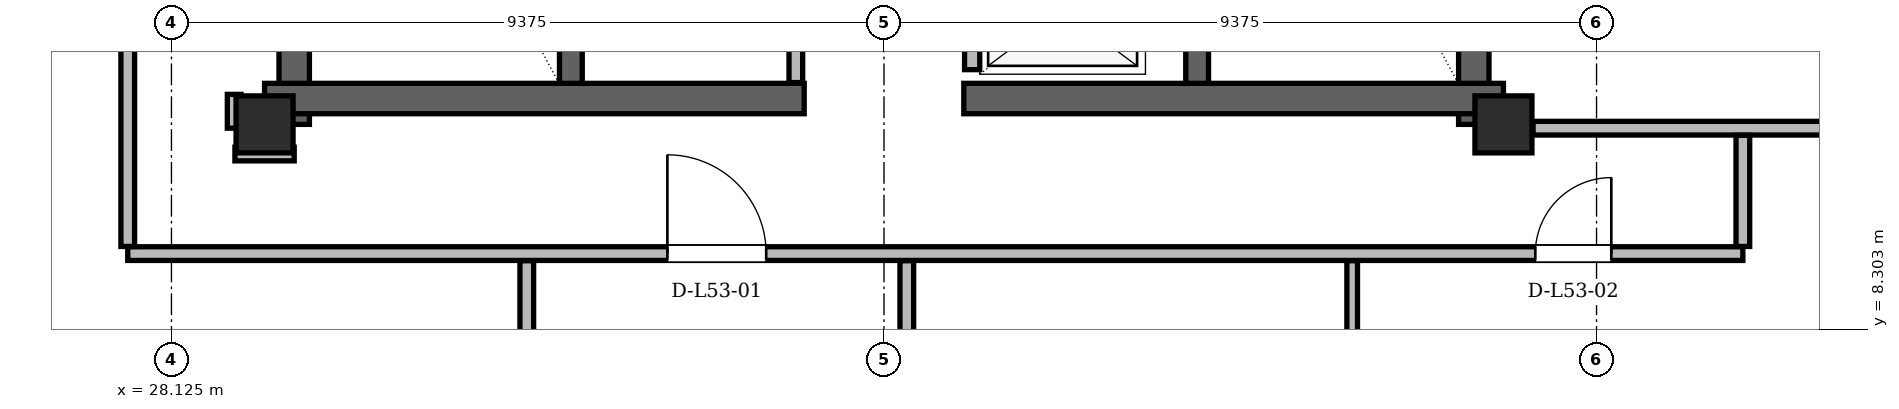
"""IFC4 building model, lengths in metres.
Left out: names, types, materials, properties, quantities, classifications, styles, units other than length and angle.
Written with IfcOpenShell. Run it as: python <this file> out.ifc"""

import sys

from ifc_helpers import new_model, si_unit, direction, frame, frame_2d, origin, origin_2d, place, context, subcontext, project, spatial, rectangle, hollow_rectangle, extrude, element, fill, save


model = new_model("IFC4")
c1 = context("Model", 3, precision=1e-05, world=origin(), true_north=direction((0.0, 1.0)))
c2 = subcontext(c1, "Body", "Model", "MODEL_VIEW")
j1 = project(units=[si_unit("LENGTHUNIT", "METRE"), si_unit("PLANEANGLEUNIT", "RADIAN")], contexts=[c1])
p1 = place(None, origin())
s1 = spatial("IfcSite", under=j1, at=p1, CompositionType="ELEMENT")
p2 = place(p1, origin())
s2 = spatial("IfcBuilding", under=s1, at=p2, CompositionType="ELEMENT")
p3 = place(p2, frame((0.0, 0.0, 201.0)))
s3 = spatial("IfcBuildingStorey", under=s2, at=p3, CompositionType="ELEMENT", Elevation=201.0)
for number, where, z_axis, x_axis in (
    (1, (29.35, 11.0, 0.0), (0.0, 0.0, 1.0), (1.0, 0.0, 0.0)),
    (2, (45.65, 11.0, 0.0), (0.0, 0.0, 1.0), (1.0, 0.0, 0.0)),
):
    element("IfcColumn", number, at=place(p3, frame(where, z_axis=z_axis, x_axis=x_axis)), inside=s3, PredefinedType="COLUMN", context=c2, shape_type="SweptSolid", body=[
        extrude(hollow_rectangle(XDim=0.75, YDim=0.75, WallThickness=0.06, at=origin_2d()), origin(), (0.0, 0.0, 1.0), 3.6),
    ])
for number, where, z_axis, x_axis in (
    (3, (29.74, 11.0, 0.0), (0.0, 0.0, 1.0), (0.0, 1.0, 0.0)),
    (4, (45.26, 11.0, 0.0), (0.0, 0.0, 1.0), (0.0, 1.0, 0.0)),
):
    element("IfcWall", number, at=place(p3, frame(where, z_axis=z_axis, x_axis=x_axis)), inside=s3, PredefinedType="SHEAR", context=c2, shape_type="SweptSolid", body=[
        extrude(rectangle(XDim=13.3, YDim=0.4, at=frame_2d((6.65, 0.0))), origin(), (0.0, 0.0, 1.0), 3.38),
    ])
for number, where, z_axis, x_axis in (
    (5, (29.35, 11.34, 0.0), (0.0, 0.0, 1.0), (1.0, 0.0, 0.0)),
    (6, (38.55, 11.34, 0.0), (0.0, 0.0, 1.0), (1.0, 0.0, 0.0)),
):
    element("IfcWall", number, at=place(p3, frame(where, z_axis=z_axis, x_axis=x_axis)), inside=s3, PredefinedType="SHEAR", context=c2, shape_type="SweptSolid", body=[
        extrude(rectangle(XDim=7.1, YDim=0.4, at=frame_2d((3.55, 0.0))), origin(), (0.0, 0.0, 1.0), 3.38),
    ])
for number, where, z_axis, x_axis in (
    (7, (33.38, 11.54, 0.0), (0.0, 0.0, 1.0), (0.0, 1.0, 0.0)),
    (8, (41.62, 11.54, 0.0), (0.0, 0.0, 1.0), (0.0, 1.0, 0.0)),
):
    element("IfcWall", number, at=place(p3, frame(where, z_axis=z_axis, x_axis=x_axis)), inside=s3, PredefinedType="SHEAR", context=c2, shape_type="SweptSolid", body=[
        extrude(rectangle(XDim=7.62, YDim=0.3, at=frame_2d((3.81, 0.0))), origin(), (0.0, 0.0, 1.0), 3.38),
    ])
p4 = place(p3, frame((59.335, 11.719, 0.0), z_axis=(0.0, 0.0, 1.0), x_axis=(-0.500001310321, 0.866024647269, 0.0)))
e9 = element("IfcWall", 9, at=p4, inside=s3, PredefinedType="SOLIDWALL", context=c2, shape_type="SweptSolid", body=[
    extrude(rectangle(XDim=36.352, YDim=0.29, at=frame_2d((18.176, 0.0))), origin(), (0.0, 0.0, 1.0), 2.677),
])
p5 = place(p4, frame((6.579, 0.0, 0.0)))
e10 = element("IfcOpeningElement", 10, at=p5, cuts=e9, PredefinedType="OPENING", context=c2, shape_type="SweptSolid", body=[
    extrude(rectangle(XDim=1.5, YDim=2.2, at=frame_2d((0.75, 1.1))), frame((0.0, 0.145, 0.0), z_axis=(0.0, -1.0, 0.0), x_axis=(1.0, 0.0, 0.0)), (0.0, 0.0, 1.0), 0.29),
])
p6 = place(p4, frame((26.817, 0.0, 0.0)))
e11 = element("IfcOpeningElement", 11, at=p6, cuts=e9, PredefinedType="OPENING", context=c2, shape_type="SweptSolid", body=[
    extrude(rectangle(XDim=1.5, YDim=2.2, at=frame_2d((0.75, 1.1))), frame((0.0, 0.145, 0.0), z_axis=(0.0, -1.0, 0.0), x_axis=(1.0, 0.0, 0.0)), (0.0, 0.0, 1.0), 0.29),
])
p7 = place(p4, frame((34.299, 0.0, 0.85)))
e12 = element("IfcOpeningElement", 12, at=p7, cuts=e9, PredefinedType="OPENING", context=c2, shape_type="SweptSolid", body=[
    extrude(rectangle(XDim=1.2, YDim=1.48, at=frame_2d((0.6, 0.74))), frame((0.0, 0.145, 0.0), z_axis=(0.0, -1.0, 0.0), x_axis=(1.0, 0.0, 0.0)), (0.0, 0.0, 1.0), 0.29),
])
p8 = place(p4, frame((16.249, 0.0, 0.85)))
e13 = element("IfcOpeningElement", 13, at=p8, cuts=e9, PredefinedType="OPENING", context=c2, shape_type="SweptSolid", body=[
    extrude(rectangle(XDim=2.4, YDim=1.717, at=frame_2d((1.2, 0.858))), frame((0.0, 0.145, 0.0), z_axis=(0.0, -1.0, 0.0), x_axis=(1.0, 0.0, 0.0)), (0.0, 0.0, 1.0), 0.29),
])
p9 = place(p4, frame((22.63, 0.0, 0.85)))
e14 = element("IfcOpeningElement", 14, at=p9, cuts=e9, PredefinedType="OPENING", context=c2, shape_type="SweptSolid", body=[
    extrude(rectangle(XDim=1.8, YDim=1.717, at=frame_2d((0.9, 0.858))), frame((0.0, 0.145, 0.0), z_axis=(0.0, -1.0, 0.0), x_axis=(1.0, 0.0, 0.0)), (0.0, 0.0, 1.0), 0.29),
])
p10 = place(p4, frame((32.084, 0.0, 0.85)))
e15 = element("IfcOpeningElement", 15, at=p10, cuts=e9, PredefinedType="OPENING", context=c2, shape_type="SweptSolid", body=[
    extrude(rectangle(XDim=1.6, YDim=1.7, at=frame_2d((0.8, 0.85))), frame((0.0, 0.145, 0.0), z_axis=(0.0, -1.0, 0.0), x_axis=(1.0, 0.0, 0.0)), (0.0, 0.0, 1.0), 0.29),
])
p11 = place(p3, frame((33.841, 43.2, 0.0), z_axis=(0.0, 0.0, 1.0), x_axis=(-0.500001310321, -0.866024647269, 0.0)))
e16 = element("IfcWall", 16, at=p11, inside=s3, PredefinedType="SOLIDWALL", context=c2, shape_type="SweptSolid", body=[
    extrude(rectangle(XDim=36.352, YDim=0.29, at=frame_2d((18.176, 0.0))), origin(), (0.0, 0.0, 1.0), 2.677),
])
p12 = place(p11, frame((6.579, 0.0, 0.0)))
e17 = element("IfcOpeningElement", 17, at=p12, cuts=e16, PredefinedType="OPENING", context=c2, shape_type="SweptSolid", body=[
    extrude(rectangle(XDim=1.5, YDim=2.2, at=frame_2d((0.75, 1.1))), frame((0.0, 0.145, 0.0), z_axis=(0.0, -1.0, 0.0), x_axis=(1.0, 0.0, 0.0)), (0.0, 0.0, 1.0), 0.29),
])
p13 = place(p11, frame((26.818, 0.0, 0.0)))
e18 = element("IfcOpeningElement", 18, at=p13, cuts=e16, PredefinedType="OPENING", context=c2, shape_type="SweptSolid", body=[
    extrude(rectangle(XDim=1.5, YDim=2.2, at=frame_2d((0.75, 1.1))), frame((0.0, 0.145, 0.0), z_axis=(0.0, -1.0, 0.0), x_axis=(1.0, 0.0, 0.0)), (0.0, 0.0, 1.0), 0.29),
])
p14 = place(p11, frame((32.924, 0.0, 0.85)))
e19 = element("IfcOpeningElement", 19, at=p14, cuts=e16, PredefinedType="OPENING", context=c2, shape_type="SweptSolid", body=[
    extrude(rectangle(XDim=1.2, YDim=1.48, at=frame_2d((0.6, 0.74))), frame((0.0, 0.145, 0.0), z_axis=(0.0, -1.0, 0.0), x_axis=(1.0, 0.0, 0.0)), (0.0, 0.0, 1.0), 0.29),
])
p15 = place(p11, frame((21.949, 0.0, 0.85)))
e20 = element("IfcOpeningElement", 20, at=p15, cuts=e16, PredefinedType="OPENING", context=c2, shape_type="SweptSolid", body=[
    extrude(rectangle(XDim=2.0, YDim=1.717, at=frame_2d((1.0, 0.858))), frame((0.0, 0.145, 0.0), z_axis=(0.0, -1.0, 0.0), x_axis=(1.0, 0.0, 0.0)), (0.0, 0.0, 1.0), 0.29),
])
p16 = place(p11, frame((2.823, 0.0, 0.85)))
e21 = element("IfcOpeningElement", 21, at=p16, cuts=e16, PredefinedType="OPENING", context=c2, shape_type="SweptSolid", body=[
    extrude(rectangle(XDim=1.6, YDim=1.7, at=frame_2d((0.8, 0.85))), frame((0.0, 0.145, 0.0), z_axis=(0.0, -1.0, 0.0), x_axis=(1.0, 0.0, 0.0)), (0.0, 0.0, 1.0), 0.29),
])
p17 = place(p11, frame((15.99, 0.0, 0.85)))
e22 = element("IfcOpeningElement", 22, at=p17, cuts=e16, PredefinedType="OPENING", context=c2, shape_type="SweptSolid", body=[
    extrude(rectangle(XDim=3.0, YDim=1.717, at=frame_2d((1.5, 0.858))), frame((0.0, 0.145, 0.0), z_axis=(0.0, -1.0, 0.0), x_axis=(1.0, 0.0, 0.0)), (0.0, 0.0, 1.0), 0.29),
])
p18 = place(p3, frame((36.34, 11.55, 0.0), z_axis=(0.0, 0.0, 1.0), x_axis=(0.0, 1.0, 0.0)))
e23 = element("IfcWall", 23, at=p18, inside=s3, PredefinedType="PARTITIONING", context=c2, shape_type="SweptSolid", body=[
    extrude(rectangle(XDim=5.55, YDim=0.18, at=frame_2d((2.775, 0.0))), origin(), (0.0, 0.0, 1.0), 3.38),
])
p19 = place(p18, frame((2.85, 0.0, 0.0)))
e24 = element("IfcOpeningElement", 24, at=p19, cuts=e23, PredefinedType="OPENING", context=c2, shape_type="SweptSolid", body=[
    extrude(rectangle(XDim=0.95, YDim=2.1, at=frame_2d((0.475, 1.05))), frame((0.0, 0.09, 0.0), z_axis=(0.0, -1.0, 0.0), x_axis=(1.0, 0.0, 0.0)), (0.0, 0.0, 1.0), 0.18),
])
p20 = place(p3, frame((38.66, 11.72, 0.0), z_axis=(0.0, 0.0, 1.0), x_axis=(0.0, 1.0, 0.0)))
e25 = element("IfcWall", 25, at=p20, inside=s3, PredefinedType="PARTITIONING", context=c2, shape_type="SweptSolid", body=[
    extrude(rectangle(XDim=9.1, YDim=0.2, at=frame_2d((4.55, 0.0))), origin(), (0.0, 0.0, 1.0), 3.38),
])
p21 = place(p20, frame((0.255, 0.0, 0.0)))
e26 = element("IfcOpeningElement", 26, at=p21, cuts=e25, PredefinedType="OPENING", context=c2, shape_type="SweptSolid", body=[
    extrude(rectangle(XDim=1.05, YDim=2.15, at=frame_2d((0.525, 1.075))), frame((0.0, 0.1, 0.0), z_axis=(0.0, -1.0, 0.0), x_axis=(1.0, 0.0, 0.0)), (0.0, 0.0, 1.0), 0.2),
])
p22 = place(p20, frame((2.105, 0.0, 0.0)))
e27 = element("IfcOpeningElement", 27, at=p22, cuts=e25, PredefinedType="OPENING", context=c2, shape_type="SweptSolid", body=[
    extrude(rectangle(XDim=1.05, YDim=2.15, at=frame_2d((0.525, 1.075))), frame((0.0, 0.1, 0.0), z_axis=(0.0, -1.0, 0.0), x_axis=(1.0, 0.0, 0.0)), (0.0, 0.0, 1.0), 0.2),
])
p23 = place(p20, frame((3.955, 0.0, 0.0)))
e28 = element("IfcOpeningElement", 28, at=p23, cuts=e25, PredefinedType="OPENING", context=c2, shape_type="SweptSolid", body=[
    extrude(rectangle(XDim=1.05, YDim=2.15, at=frame_2d((0.525, 1.075))), frame((0.0, 0.1, 0.0), z_axis=(0.0, -1.0, 0.0), x_axis=(1.0, 0.0, 0.0)), (0.0, 0.0, 1.0), 0.2),
])
p24 = place(p3, frame((27.55, 9.3, 0.0), z_axis=(0.0, 0.0, 1.0), x_axis=(1.0, 0.0, 0.0)))
e29 = element("IfcWall", 29, at=p24, inside=s3, PredefinedType="PARTITIONING", context=c2, shape_type="SweptSolid", body=[
    extrude(rectangle(XDim=21.25, YDim=0.18, at=frame_2d((10.625, 0.0))), origin(), (0.0, 0.0, 1.0), 2.913),
])
p25 = place(p24, frame((7.1, 0.0, 0.0)))
e30 = element("IfcOpeningElement", 30, at=p25, cuts=e29, PredefinedType="OPENING", context=c2, shape_type="SweptSolid", body=[
    extrude(rectangle(XDim=1.3, YDim=2.2, at=frame_2d((0.65, 1.1))), frame((0.0, 0.09, 0.0), z_axis=(0.0, -1.0, 0.0), x_axis=(1.0, 0.0, 0.0)), (0.0, 0.0, 1.0), 0.18),
])
p26 = place(p24, frame((18.519, 0.0, 0.0)))
e31 = element("IfcOpeningElement", 31, at=p26, cuts=e29, PredefinedType="OPENING", context=c2, shape_type="SweptSolid", body=[
    extrude(rectangle(XDim=1.0, YDim=2.18, at=frame_2d((0.5, 1.09))), frame((0.0, 0.09, 0.0), z_axis=(0.0, -1.0, 0.0), x_axis=(1.0, 0.0, 0.0)), (0.0, 0.0, 1.0), 0.18),
])
p27 = place(p3, frame((28.96, 10.61, 0.0), z_axis=(0.0, 0.0, 1.0), x_axis=(1.0, 0.0, 0.0)))
e32 = element("IfcWall", 32, at=p27, inside=s3, PredefinedType="PARTITIONING", context=c2, shape_type="SweptSolid", body=[
    extrude(rectangle(XDim=0.78, YDim=0.18, at=frame_2d((0.39, 0.0))), origin(), (0.0, 0.0, 1.0), 3.38),
])
p28 = place(p3, frame((46.04, 10.95, 0.0), z_axis=(0.0, 0.0, 1.0), x_axis=(1.0, 0.0, 0.0)))
e33 = element("IfcWall", 33, at=p28, inside=s3, PredefinedType="PARTITIONING", context=c2, shape_type="SweptSolid", body=[
    extrude(rectangle(XDim=12.679, YDim=0.18, at=frame_2d((6.34, 0.0))), origin(), (0.0, 0.0, 1.0), 2.913),
])
p29 = place(p3, frame((27.55, 9.394, 0.0), z_axis=(0.0, 0.0, 1.0), x_axis=(0.0, 1.0, 0.0)))
e34 = element("IfcWall", 34, at=p29, inside=s3, PredefinedType="PARTITIONING", context=c2, shape_type="SweptSolid", body=[
    extrude(rectangle(XDim=7.312, YDim=0.18, at=frame_2d((3.656, 0.0))), origin(), (0.0, 0.0, 1.0), 2.913),
])
p30 = place(p29, frame((3.927, 0.0, 0.0)))
e35 = element("IfcOpeningElement", 35, at=p30, cuts=e34, PredefinedType="OPENING", context=c2, shape_type="SweptSolid", body=[
    extrude(rectangle(XDim=1.0, YDim=2.18, at=frame_2d((0.5, 1.09))), frame((0.0, 0.09, 0.0), z_axis=(0.0, -1.0, 0.0), x_axis=(1.0, 0.0, 0.0)), (0.0, 0.0, 1.0), 0.18),
])
p31 = place(p3, frame((28.95, 10.95, 0.0), z_axis=(0.0, 0.0, 1.0), x_axis=(0.0, 1.0, 0.0)))
e36 = element("IfcWall", 36, at=p31, inside=s3, PredefinedType="PARTITIONING", context=c2, shape_type="SweptSolid", body=[
    extrude(rectangle(XDim=0.445, YDim=0.18, at=frame_2d((0.223, 0.0))), origin(), (0.0, 0.0, 1.0), 2.913),
])
p32 = place(p3, frame((32.8, 5.53, 0.0), z_axis=(0.0, 0.0, 1.0), x_axis=(0.0, 1.0, 0.0)))
e37 = element("IfcWall", 37, at=p32, inside=s3, PredefinedType="PARTITIONING", context=c2, shape_type="SweptSolid", body=[
    extrude(rectangle(XDim=3.676, YDim=0.18, at=frame_2d((1.838, 0.0))), origin(), (0.0, 0.0, 1.0), 2.966),
])
p33 = place(p3, frame((37.8, 5.53, 0.0), z_axis=(0.0, 0.0, 1.0), x_axis=(0.0, 1.0, 0.0)))
e38 = element("IfcWall", 38, at=p33, inside=s3, PredefinedType="PARTITIONING", context=c2, shape_type="SweptSolid", body=[
    extrude(rectangle(XDim=3.676, YDim=0.18, at=frame_2d((1.838, 0.0))), origin(), (0.0, 0.0, 1.0), 3.38),
])
p34 = place(p3, frame((43.66, 5.53, 0.0), z_axis=(0.0, 0.0, 1.0), x_axis=(0.0, 1.0, 0.0)))
e39 = element("IfcWall", 39, at=p34, inside=s3, PredefinedType="PARTITIONING", context=c2, shape_type="SweptSolid", body=[
    extrude(rectangle(XDim=3.676, YDim=0.14, at=frame_2d((1.838, 0.0))), origin(), (0.0, 0.0, 1.0), 3.38),
])
p35 = place(p34, frame((1.446, 0.0, 0.0)))
e40 = element("IfcOpeningElement", 40, at=p35, cuts=e39, PredefinedType="OPENING", context=c2, shape_type="SweptSolid", body=[
    extrude(rectangle(XDim=0.88, YDim=2.08, at=frame_2d((0.44, 1.04))), frame((0.0, 0.07, 0.0), z_axis=(0.0, -1.0, 0.0), x_axis=(1.0, 0.0, 0.0)), (0.0, 0.0, 1.0), 0.14),
])
p36 = place(p3, frame((48.8, 9.394, 0.0), z_axis=(0.0, 0.0, 1.0), x_axis=(0.0, 1.0, 0.0)))
e41 = element("IfcWall", 41, at=p36, inside=s3, PredefinedType="PARTITIONING", context=c2, shape_type="SweptSolid", body=[
    extrude(rectangle(XDim=1.462, YDim=0.18, at=frame_2d((0.731, 0.0))), origin(), (0.0, 0.0, 1.0), 3.38),
])
p37 = place(p25, origin())
e42 = element("IfcDoor", 42, at=p37, inside=s3, OperationType="SINGLE_SWING_LEFT", PredefinedType="DOOR", context=c2, shape_type="SweptSolid", body=[
    extrude(rectangle(XDim=1.3, YDim=2.2, at=frame_2d((0.65, 1.1))), frame((0.0, 0.025, 0.0), z_axis=(0.0, -1.0, 0.0), x_axis=(1.0, 0.0, 0.0)), (0.0, 0.0, 1.0), 0.05),
])
fill(e30, e42)
p38 = place(p26, origin())
e43 = element("IfcDoor", 43, at=p38, inside=s3, OperationType="SINGLE_SWING_RIGHT", PredefinedType="DOOR", context=c2, shape_type="SweptSolid", body=[
    extrude(rectangle(XDim=1.0, YDim=2.18, at=frame_2d((0.5, 1.09))), frame((0.0, 0.025, 0.0), z_axis=(0.0, -1.0, 0.0), x_axis=(1.0, 0.0, 0.0)), (0.0, 0.0, 1.0), 0.05),
])
fill(e31, e43)
save(model, sys.argv[1])
